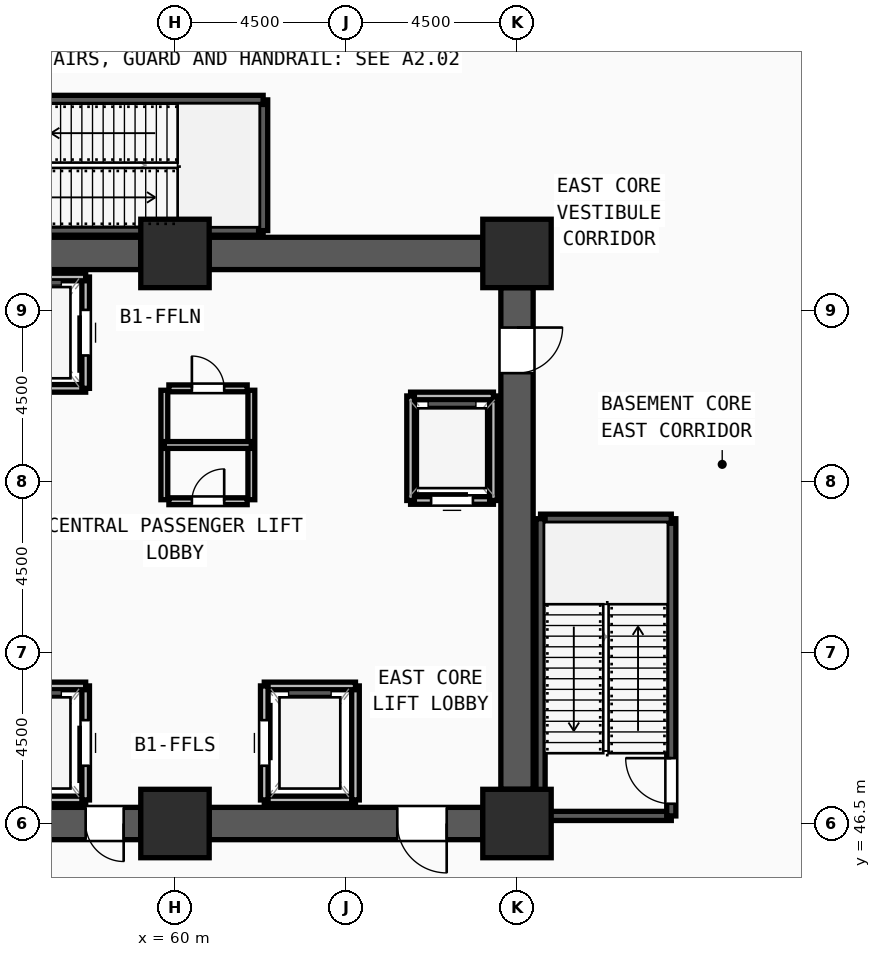
"""IFC4 building model, lengths in metres.
Left out: names, types, materials, properties, quantities, classifications, styles, units other than length and angle.
Written with IfcOpenShell. Run it as: python <this file> out.ifc"""

import sys

from ifc_helpers import new_model, si_unit, direction, frame, frame_2d, origin, origin_2d, place, context, subcontext, project, spatial, rectangle, extrude, source, transform, mapped, element, fill, save


model = new_model("IFC4")
c1 = context("Model", 3, precision=1e-05, world=origin(), true_north=direction((0.0, 1.0)))
c2 = subcontext(c1, "Body", "Model", "MODEL_VIEW")
j1 = project(units=[si_unit("LENGTHUNIT", "METRE"), si_unit("PLANEANGLEUNIT", "RADIAN")], contexts=[c1])
p1 = place(None, origin())
s1 = spatial("IfcSite", under=j1, at=p1, CompositionType="ELEMENT")
p2 = place(p1, origin())
s2 = spatial("IfcBuilding", under=s1, at=p2, CompositionType="ELEMENT")
p3 = place(p2, frame((0.0, 0.0, -4.8)))
s3 = spatial("IfcBuildingStorey", under=s2, at=p3, CompositionType="ELEMENT", Elevation=-4.8)
m1 = source(origin(), c2, "Body", "SweptSolid", [
    extrude(rectangle(XDim=1.8, YDim=1.8, at=origin_2d()), origin(), (0.0, 0.0, 1.0), 4.8),
])
for number, where, z_axis, x_axis in (
    (1, (60.0, 46.5, 0.0), (0.0, 0.0, 1.0), (1.0, 0.0, 0.0)),
    (2, (69.0, 46.5, 0.0), (0.0, 0.0, 1.0), (1.0, 0.0, 0.0)),
    (3, (69.0, 61.5, 0.0), (0.0, 0.0, 1.0), (1.0, 0.0, 0.0)),
    (4, (60.0, 61.5, 0.0), (0.0, 0.0, 1.0), (1.0, 0.0, 0.0)),
):
    element("IfcColumn", number, at=place(p3, frame(where, z_axis=z_axis, x_axis=x_axis)), inside=s3, PredefinedType="COLUMN", context=c2, shape_type="MappedRepresentation", body=[
        mapped(m1, transform((0.0, 0.0, 0.0), x_axis=(1.0, 0.0, 0.0), y_axis=(0.0, 1.0, 0.0), z_axis=(0.0, 0.0, 1.0), scale=1.0)),
    ])
for number, where, z_axis, x_axis in (
    (5, (51.9, 61.5, 0.0), (0.0, 0.0, 1.0), (1.0, 0.0, 0.0)),
    (6, (60.9, 61.5, 0.0), (0.0, 0.0, 1.0), (1.0, 0.0, 0.0)),
):
    element("IfcWall", number, at=place(p3, frame(where, z_axis=z_axis, x_axis=x_axis)), inside=s3, PredefinedType="SHEAR", context=c2, shape_type="SweptSolid", body=[
        extrude(rectangle(XDim=7.2, YDim=0.85, at=frame_2d((3.6, 0.0))), origin(), (0.0, 0.0, 1.0), 4.55),
    ])
p4 = place(p3, frame((69.0, 60.6, 0.0), z_axis=(0.0, 0.0, 1.0), x_axis=(0.0, -1.0, 0.0)))
e7 = element("IfcWall", 7, at=p4, inside=s3, PredefinedType="SHEAR", context=c2, shape_type="SweptSolid", body=[
    extrude(rectangle(XDim=13.2, YDim=0.85, at=frame_2d((6.6, 0.0))), origin(), (0.0, 0.0, 1.0), 4.55),
])
m2 = source(origin(), c2, "Body", "SweptSolid", [
    extrude(rectangle(XDim=1.2, YDim=2.2, at=frame_2d((0.6, 1.1))), frame((0.0, 0.435, 0.0), z_axis=(0.0, -1.0, 0.0), x_axis=(1.0, 0.0, 0.0)), (0.0, 0.0, 1.0), 0.87),
])
p5 = place(p4, frame((1.05, 0.0, 0.0)))
e8 = element("IfcOpeningElement", 8, at=p5, cuts=e7, PredefinedType="OPENING", context=c2, shape_type="MappedRepresentation", body=[
    mapped(m2, transform((0.0, 0.0, 0.0), x_axis=(1.0, 0.0, 0.0), y_axis=(0.0, 1.0, 0.0), z_axis=(0.0, 0.0, 1.0), scale=1.0)),
])
p6 = place(p3, frame((68.1, 46.5, 0.0), z_axis=(0.0, 0.0, 1.0), x_axis=(-1.0, 0.0, 0.0)))
e9 = element("IfcWall", 9, at=p6, inside=s3, PredefinedType="SHEAR", context=c2, shape_type="SweptSolid", body=[
    extrude(rectangle(XDim=7.2, YDim=0.85, at=frame_2d((3.6, 0.0))), origin(), (0.0, 0.0, 1.0), 4.55),
])
m3 = source(origin(), c2, "Body", "SweptSolid", [
    extrude(rectangle(XDim=1.3, YDim=2.2, at=frame_2d((0.65, 1.1))), frame((0.0, 0.435, 0.0), z_axis=(0.0, -1.0, 0.0), x_axis=(1.0, 0.0, 0.0)), (0.0, 0.0, 1.0), 0.87),
])
p7 = place(p6, frame((0.95, 0.0, 0.0)))
e10 = element("IfcOpeningElement", 10, at=p7, cuts=e9, PredefinedType="OPENING", context=c2, shape_type="MappedRepresentation", body=[
    mapped(m3, transform((0.0, 0.0, 0.0), x_axis=(1.0, 0.0, 0.0), y_axis=(0.0, 1.0, 0.0), z_axis=(0.0, 0.0, 1.0), scale=1.0)),
])
p8 = place(p3, frame((59.1, 46.5, 0.0), z_axis=(0.0, 0.0, 1.0), x_axis=(-1.0, 0.0, 0.0)))
e11 = element("IfcWall", 11, at=p8, inside=s3, PredefinedType="SHEAR", context=c2, shape_type="SweptSolid", body=[
    extrude(rectangle(XDim=7.2, YDim=0.85, at=frame_2d((3.6, 0.0))), origin(), (0.0, 0.0, 1.0), 4.55),
])
p9 = place(p8, frame((4.95, 0.0, 0.0)))
e12 = element("IfcOpeningElement", 12, at=p9, cuts=e11, PredefinedType="OPENING", context=c2, shape_type="MappedRepresentation", body=[
    mapped(m3, transform((0.0, 0.0, 0.0), x_axis=(1.0, 0.0, 0.0), y_axis=(0.0, 1.0, 0.0), z_axis=(0.0, 0.0, 1.0), scale=1.0)),
])
m4 = source(origin(), c2, "Body", "SweptSolid", [
    extrude(rectangle(XDim=1.0, YDim=2.2, at=frame_2d((0.5, 1.1))), frame((0.0, 0.435, 0.0), z_axis=(0.0, -1.0, 0.0), x_axis=(1.0, 0.0, 0.0)), (0.0, 0.0, 1.0), 0.87),
])
p10 = place(p8, frame((0.45, 0.0, 0.0)))
e13 = element("IfcOpeningElement", 13, at=p10, cuts=e11, PredefinedType="OPENING", context=c2, shape_type="MappedRepresentation", body=[
    mapped(m4, transform((0.0, 0.0, 0.0), x_axis=(1.0, 0.0, 0.0), y_axis=(0.0, 1.0, 0.0), z_axis=(0.0, 0.0, 1.0), scale=1.0)),
])
p11 = place(p3, frame((69.62, 46.7, 0.0), z_axis=(0.0, 0.0, 1.0), x_axis=(1.0, 0.0, 0.0)))
e14 = element("IfcWall", 14, at=p11, inside=s3, PredefinedType="SOLIDWALL", context=c2, shape_type="SweptSolid", body=[
    extrude(rectangle(XDim=3.44, YDim=0.24, at=frame_2d((1.72, 0.0))), origin(), (0.0, 0.0, 1.0), 4.55),
])
p12 = place(p3, frame((73.06, 46.7, 0.0), z_axis=(0.0, 0.0, 1.0), x_axis=(0.0, 1.0, 0.0)))
e15 = element("IfcWall", 15, at=p12, inside=s3, PredefinedType="SOLIDWALL", context=c2, shape_type="SweptSolid", body=[
    extrude(rectangle(XDim=7.82, YDim=0.24, at=frame_2d((3.91, 0.0))), origin(), (0.0, 0.0, 1.0), 4.55),
])
m5 = source(origin(), c2, "Body", "SweptSolid", [
    extrude(rectangle(XDim=1.2, YDim=2.2, at=frame_2d((0.6, 1.1))), frame((0.0, 0.13, 0.0), z_axis=(0.0, -1.0, 0.0), x_axis=(1.0, 0.0, 0.0)), (0.0, 0.0, 1.0), 0.26),
])
p13 = place(p12, frame((0.32, 0.0, 0.0)))
e16 = element("IfcOpeningElement", 16, at=p13, cuts=e15, PredefinedType="OPENING", context=c2, shape_type="MappedRepresentation", body=[
    mapped(m5, transform((0.0, 0.0, 0.0), x_axis=(1.0, 0.0, 0.0), y_axis=(0.0, 1.0, 0.0), z_axis=(0.0, 0.0, 1.0), scale=1.0)),
])
p14 = place(p3, frame((73.06, 54.52, 0.0), z_axis=(0.0, 0.0, 1.0), x_axis=(-1.0, 0.0, 0.0)))
e17 = element("IfcWall", 17, at=p14, inside=s3, PredefinedType="SOLIDWALL", context=c2, shape_type="SweptSolid", body=[
    extrude(rectangle(XDim=3.44, YDim=0.24, at=frame_2d((1.72, 0.0))), origin(), (0.0, 0.0, 1.0), 4.55),
])
for number, where, z_axis, x_axis in (
    (18, (69.62, 54.52, 0.0), (0.0, 0.0, 1.0), (0.0, -1.0, 0.0)),
    (19, (54.5, 62.1, 0.0), (0.0, 0.0, 1.0), (1.0, 0.0, 0.0)),
):
    element("IfcWall", number, at=place(p3, frame(where, z_axis=z_axis, x_axis=x_axis)), inside=s3, PredefinedType="SOLIDWALL", context=c2, shape_type="SweptSolid", body=[
        extrude(rectangle(XDim=7.82, YDim=0.24, at=frame_2d((3.91, 0.0))), origin(), (0.0, 0.0, 1.0), 4.55),
    ])
p15 = place(p3, frame((62.32, 62.1, 0.0), z_axis=(0.0, 0.0, 1.0), x_axis=(0.0, 1.0, 0.0)))
e20 = element("IfcWall", 20, at=p15, inside=s3, PredefinedType="SOLIDWALL", context=c2, shape_type="SweptSolid", body=[
    extrude(rectangle(XDim=3.44, YDim=0.24, at=frame_2d((1.72, 0.0))), origin(), (0.0, 0.0, 1.0), 4.55),
])
p16 = place(p3, frame((62.32, 65.54, 0.0), z_axis=(0.0, 0.0, 1.0), x_axis=(-1.0, 0.0, 0.0)))
e21 = element("IfcWall", 21, at=p16, inside=s3, PredefinedType="SOLIDWALL", context=c2, shape_type="SweptSolid", body=[
    extrude(rectangle(XDim=7.82, YDim=0.24, at=frame_2d((3.91, 0.0))), origin(), (0.0, 0.0, 1.0), 4.55),
])
p17 = place(p16, frame((6.3, 0.0, 0.0)))
e22 = element("IfcOpeningElement", 22, at=p17, cuts=e21, PredefinedType="OPENING", context=c2, shape_type="MappedRepresentation", body=[
    mapped(m5, transform((0.0, 0.0, 0.0), x_axis=(1.0, 0.0, 0.0), y_axis=(0.0, 1.0, 0.0), z_axis=(0.0, 0.0, 1.0), scale=1.0)),
])
p18 = place(p3, frame((55.25, 47.12, 0.0), z_axis=(0.0, 0.0, 1.0), x_axis=(1.0, 0.0, 0.0)))
e23 = element("IfcWall", 23, at=p18, inside=s3, PredefinedType="SOLIDWALL", context=c2, shape_type="SweptSolid", body=[
    extrude(rectangle(XDim=2.4, YDim=0.2, at=frame_2d((1.2, 0.0))), origin(), (0.0, 0.0, 1.0), 4.55),
])
p19 = place(p3, frame((57.65, 47.12, 0.0), z_axis=(0.0, 0.0, 1.0), x_axis=(0.0, 1.0, 0.0)))
e24 = element("IfcWall", 24, at=p19, inside=s3, PredefinedType="SOLIDWALL", context=c2, shape_type="SweptSolid", body=[
    extrude(rectangle(XDim=3.0, YDim=0.2, at=frame_2d((1.5, 0.0))), origin(), (0.0, 0.0, 1.0), 4.55),
])
m6 = source(origin(), c2, "Body", "SweptSolid", [
    extrude(rectangle(XDim=1.2, YDim=2.3, at=frame_2d((0.6, 1.15))), frame((0.0, 0.11, 0.0), z_axis=(0.0, -1.0, 0.0), x_axis=(1.0, 0.0, 0.0)), (0.0, 0.0, 1.0), 0.22),
])
p20 = place(p19, frame((0.9, 0.0, 0.0)))
e25 = element("IfcOpeningElement", 25, at=p20, cuts=e24, PredefinedType="OPENING", context=c2, shape_type="MappedRepresentation", body=[
    mapped(m6, transform((0.0, 0.0, 0.0), x_axis=(1.0, 0.0, 0.0), y_axis=(0.0, 1.0, 0.0), z_axis=(0.0, 0.0, 1.0), scale=1.0)),
])
for number, where, z_axis, x_axis in (
    (26, (57.65, 50.12, 0.0), (0.0, 0.0, 1.0), (-1.0, 0.0, 0.0)),
    (27, (62.35, 47.12, 0.0), (0.0, 0.0, 1.0), (1.0, 0.0, 0.0)),
):
    element("IfcWall", number, at=place(p3, frame(where, z_axis=z_axis, x_axis=x_axis)), inside=s3, PredefinedType="SOLIDWALL", context=c2, shape_type="SweptSolid", body=[
        extrude(rectangle(XDim=2.4, YDim=0.2, at=frame_2d((1.2, 0.0))), origin(), (0.0, 0.0, 1.0), 4.55),
    ])
p21 = place(p3, frame((64.75, 47.12, 0.0), z_axis=(0.0, 0.0, 1.0), x_axis=(0.0, 1.0, 0.0)))
e28 = element("IfcWall", 28, at=p21, inside=s3, PredefinedType="SOLIDWALL", context=c2, shape_type="SweptSolid", body=[
    extrude(rectangle(XDim=3.0, YDim=0.2, at=frame_2d((1.5, 0.0))), origin(), (0.0, 0.0, 1.0), 4.55),
])
p22 = place(p3, frame((64.75, 50.12, 0.0), z_axis=(0.0, 0.0, 1.0), x_axis=(-1.0, 0.0, 0.0)))
e29 = element("IfcWall", 29, at=p22, inside=s3, PredefinedType="SOLIDWALL", context=c2, shape_type="SweptSolid", body=[
    extrude(rectangle(XDim=2.4, YDim=0.2, at=frame_2d((1.2, 0.0))), origin(), (0.0, 0.0, 1.0), 4.55),
])
p23 = place(p3, frame((62.35, 50.12, 0.0), z_axis=(0.0, 0.0, 1.0), x_axis=(0.0, -1.0, 0.0)))
e30 = element("IfcWall", 30, at=p23, inside=s3, PredefinedType="SOLIDWALL", context=c2, shape_type="SweptSolid", body=[
    extrude(rectangle(XDim=3.0, YDim=0.2, at=frame_2d((1.5, 0.0))), origin(), (0.0, 0.0, 1.0), 4.55),
])
p24 = place(p23, frame((0.9, 0.0, 0.0)))
e31 = element("IfcOpeningElement", 31, at=p24, cuts=e30, PredefinedType="OPENING", context=c2, shape_type="MappedRepresentation", body=[
    mapped(m6, transform((0.0, 0.0, 0.0), x_axis=(1.0, 0.0, 0.0), y_axis=(0.0, 1.0, 0.0), z_axis=(0.0, 0.0, 1.0), scale=1.0)),
])
p25 = place(p3, frame((55.25, 57.95, 0.0), z_axis=(0.0, 0.0, 1.0), x_axis=(1.0, 0.0, 0.0)))
e32 = element("IfcWall", 32, at=p25, inside=s3, PredefinedType="SOLIDWALL", context=c2, shape_type="SweptSolid", body=[
    extrude(rectangle(XDim=2.4, YDim=0.2, at=frame_2d((1.2, 0.0))), origin(), (0.0, 0.0, 1.0), 4.55),
])
p26 = place(p3, frame((57.65, 57.95, 0.0), z_axis=(0.0, 0.0, 1.0), x_axis=(0.0, 1.0, 0.0)))
e33 = element("IfcWall", 33, at=p26, inside=s3, PredefinedType="SOLIDWALL", context=c2, shape_type="SweptSolid", body=[
    extrude(rectangle(XDim=2.93, YDim=0.2, at=frame_2d((1.465, 0.0))), origin(), (0.0, 0.0, 1.0), 4.55),
])
p27 = place(p26, frame((0.865, 0.0, 0.0)))
e34 = element("IfcOpeningElement", 34, at=p27, cuts=e33, PredefinedType="OPENING", context=c2, shape_type="MappedRepresentation", body=[
    mapped(m6, transform((0.0, 0.0, 0.0), x_axis=(1.0, 0.0, 0.0), y_axis=(0.0, 1.0, 0.0), z_axis=(0.0, 0.0, 1.0), scale=1.0)),
])
p28 = place(p3, frame((57.65, 60.88, 0.0), z_axis=(0.0, 0.0, 1.0), x_axis=(-1.0, 0.0, 0.0)))
e35 = element("IfcWall", 35, at=p28, inside=s3, PredefinedType="SOLIDWALL", context=c2, shape_type="SweptSolid", body=[
    extrude(rectangle(XDim=2.4, YDim=0.2, at=frame_2d((1.2, 0.0))), origin(), (0.0, 0.0, 1.0), 4.55),
])
p29 = place(p3, frame((66.2, 55.0, 0.0), z_axis=(0.0, 0.0, 1.0), x_axis=(1.0, 0.0, 0.0)))
e36 = element("IfcWall", 36, at=p29, inside=s3, PredefinedType="SOLIDWALL", context=c2, shape_type="SweptSolid", body=[
    extrude(rectangle(XDim=2.18, YDim=0.2, at=frame_2d((1.09, 0.0))), origin(), (0.0, 0.0, 1.0), 4.55),
])
m7 = source(origin(), c2, "Body", "SweptSolid", [
    extrude(rectangle(XDim=1.1, YDim=2.2, at=frame_2d((0.55, 1.1))), frame((0.0, 0.11, 0.0), z_axis=(0.0, -1.0, 0.0), x_axis=(1.0, 0.0, 0.0)), (0.0, 0.0, 1.0), 0.22),
])
p30 = place(p29, frame((0.54, 0.0, 0.0)))
e37 = element("IfcOpeningElement", 37, at=p30, cuts=e36, PredefinedType="OPENING", context=c2, shape_type="MappedRepresentation", body=[
    mapped(m7, transform((0.0, 0.0, 0.0), x_axis=(1.0, 0.0, 0.0), y_axis=(0.0, 1.0, 0.0), z_axis=(0.0, 0.0, 1.0), scale=1.0)),
])
p31 = place(p3, frame((68.38, 55.0, 0.0), z_axis=(0.0, 0.0, 1.0), x_axis=(0.0, 1.0, 0.0)))
e38 = element("IfcWall", 38, at=p31, inside=s3, PredefinedType="SOLIDWALL", context=c2, shape_type="SweptSolid", body=[
    extrude(rectangle(XDim=2.75, YDim=0.2, at=frame_2d((1.375, 0.0))), origin(), (0.0, 0.0, 1.0), 4.55),
])
p32 = place(p3, frame((68.38, 57.75, 0.0), z_axis=(0.0, 0.0, 1.0), x_axis=(-1.0, 0.0, 0.0)))
e39 = element("IfcWall", 39, at=p32, inside=s3, PredefinedType="SOLIDWALL", context=c2, shape_type="SweptSolid", body=[
    extrude(rectangle(XDim=2.18, YDim=0.2, at=frame_2d((1.09, 0.0))), origin(), (0.0, 0.0, 1.0), 4.55),
])
p33 = place(p3, frame((66.2, 57.75, 0.0), z_axis=(0.0, 0.0, 1.0), x_axis=(0.0, -1.0, 0.0)))
e40 = element("IfcWall", 40, at=p33, inside=s3, PredefinedType="SOLIDWALL", context=c2, shape_type="SweptSolid", body=[
    extrude(rectangle(XDim=2.75, YDim=0.2, at=frame_2d((1.375, 0.0))), origin(), (0.0, 0.0, 1.0), 4.55),
])
p34 = place(p3, frame((59.84, 54.98, 0.0), z_axis=(0.0, 0.0, 1.0), x_axis=(1.0, 0.0, 0.0)))
e41 = element("IfcWall", 41, at=p34, inside=s3, PredefinedType="PARTITIONING", context=c2, shape_type="SweptSolid", body=[
    extrude(rectangle(XDim=2.06, YDim=0.18, at=frame_2d((1.03, 0.0))), origin(), (0.0, 0.0, 1.0), 4.55),
])
m8 = source(origin(), c2, "Body", "SweptSolid", [
    extrude(rectangle(XDim=0.85, YDim=2.1, at=frame_2d((0.425, 1.05))), frame((0.0, 0.1, 0.0), z_axis=(0.0, -1.0, 0.0), x_axis=(1.0, 0.0, 0.0)), (0.0, 0.0, 1.0), 0.2),
])
p35 = place(p34, frame((0.605, 0.0, 0.0)))
e42 = element("IfcOpeningElement", 42, at=p35, cuts=e41, PredefinedType="OPENING", context=c2, shape_type="MappedRepresentation", body=[
    mapped(m8, transform((0.0, 0.0, 0.0), x_axis=(1.0, 0.0, 0.0), y_axis=(0.0, 1.0, 0.0), z_axis=(0.0, 0.0, 1.0), scale=1.0)),
])
p36 = place(p3, frame((59.84, 57.95, 0.0), z_axis=(0.0, 0.0, 1.0), x_axis=(1.0, 0.0, 0.0)))
e43 = element("IfcWall", 43, at=p36, inside=s3, PredefinedType="PARTITIONING", context=c2, shape_type="SweptSolid", body=[
    extrude(rectangle(XDim=2.06, YDim=0.18, at=frame_2d((1.03, 0.0))), origin(), (0.0, 0.0, 1.0), 4.55),
])
p37 = place(p36, frame((0.605, 0.0, 0.0)))
e44 = element("IfcOpeningElement", 44, at=p37, cuts=e43, PredefinedType="OPENING", context=c2, shape_type="MappedRepresentation", body=[
    mapped(m8, transform((0.0, 0.0, 0.0), x_axis=(1.0, 0.0, 0.0), y_axis=(0.0, 1.0, 0.0), z_axis=(0.0, 0.0, 1.0), scale=1.0)),
])
for number, where, z_axis, x_axis in (
    (45, (59.72, 55.02, 0.0), (0.0, 0.0, 1.0), (0.0, 1.0, 0.0)),
    (46, (62.01, 55.02, 0.0), (0.0, 0.0, 1.0), (0.0, 1.0, 0.0)),
):
    element("IfcWall", number, at=place(p3, frame(where, z_axis=z_axis, x_axis=x_axis)), inside=s3, PredefinedType="PARTITIONING", context=c2, shape_type="SweptSolid", body=[
        extrude(rectangle(XDim=2.88, YDim=0.18, at=frame_2d((1.44, 0.0))), origin(), (0.0, 0.0, 1.0), 4.55),
    ])
p38 = place(p3, frame((59.72, 56.46, 0.0), z_axis=(0.0, 0.0, 1.0), x_axis=(1.0, 0.0, 0.0)))
e47 = element("IfcWall", 47, at=p38, inside=s3, PredefinedType="PARTITIONING", context=c2, shape_type="SweptSolid", body=[
    extrude(rectangle(XDim=2.29, YDim=0.18, at=frame_2d((1.145, 0.0))), origin(), (0.0, 0.0, 1.0), 4.55),
])
m9 = source(origin(), c2, "Body", "SweptSolid", [
    extrude(rectangle(XDim=1.0, YDim=2.2, at=frame_2d((0.5, 1.1))), frame((0.0, 0.025, 0.0), z_axis=(0.0, -1.0, 0.0), x_axis=(1.0, 0.0, 0.0)), (0.0, 0.0, 1.0), 0.05),
])
p39 = place(p10, origin())
e48 = element("IfcDoor", 48, at=p39, inside=s3, OperationType="SINGLE_SWING_LEFT", PredefinedType="DOOR", context=c2, shape_type="MappedRepresentation", body=[
    mapped(m9, transform((0.0, 0.0, 0.0), x_axis=(1.0, 0.0, 0.0), y_axis=(0.0, 1.0, 0.0), z_axis=(0.0, 0.0, 1.0), scale=1.0)),
])
fill(e13, e48)
m10 = source(origin(), c2, "Body", "SweptSolid", [
    extrude(rectangle(XDim=1.3, YDim=2.2, at=frame_2d((0.65, 1.1))), frame((0.0, 0.025, 0.0), z_axis=(0.0, -1.0, 0.0), x_axis=(1.0, 0.0, 0.0)), (0.0, 0.0, 1.0), 0.05),
])
p40 = place(p7, origin())
e49 = element("IfcDoor", 49, at=p40, inside=s3, OperationType="SINGLE_SWING_LEFT", PredefinedType="DOOR", context=c2, shape_type="MappedRepresentation", body=[
    mapped(m10, transform((0.0, 0.0, 0.0), x_axis=(1.0, 0.0, 0.0), y_axis=(0.0, 1.0, 0.0), z_axis=(0.0, 0.0, 1.0), scale=1.0)),
])
fill(e10, e49)
m11 = source(origin(), c2, "Body", "SweptSolid", [
    extrude(rectangle(XDim=1.2, YDim=2.2, at=frame_2d((0.6, 1.1))), frame((0.0, 0.025, 0.0), z_axis=(0.0, -1.0, 0.0), x_axis=(1.0, 0.0, 0.0)), (0.0, 0.0, 1.0), 0.05),
])
p41 = place(p5, origin())
e50 = element("IfcDoor", 50, at=p41, inside=s3, OperationType="SINGLE_SWING_LEFT", PredefinedType="DOOR", context=c2, shape_type="MappedRepresentation", body=[
    mapped(m11, transform((0.0, 0.0, 0.0), x_axis=(1.0, 0.0, 0.0), y_axis=(0.0, 1.0, 0.0), z_axis=(0.0, 0.0, 1.0), scale=1.0)),
])
fill(e8, e50)
p42 = place(p13, origin())
e51 = element("IfcDoor", 51, at=p42, inside=s3, OperationType="SINGLE_SWING_RIGHT", PredefinedType="DOOR", context=c2, shape_type="MappedRepresentation", body=[
    mapped(m11, transform((0.0, 0.0, 0.0), x_axis=(1.0, 0.0, 0.0), y_axis=(0.0, 1.0, 0.0), z_axis=(0.0, 0.0, 1.0), scale=1.0)),
])
fill(e16, e51)
m12 = source(origin(), c2, "Body", "SweptSolid", [
    extrude(rectangle(XDim=1.2, YDim=2.3, at=frame_2d((0.6, 1.15))), frame((0.0, 0.025, 0.0), z_axis=(0.0, -1.0, 0.0), x_axis=(1.0, 0.0, 0.0)), (0.0, 0.0, 1.0), 0.05),
])
p43 = place(p20, origin())
e52 = element("IfcDoor", 52, at=p43, inside=s3, OperationType="SLIDING_TO_LEFT", PredefinedType="DOOR", context=c2, shape_type="MappedRepresentation", body=[
    mapped(m12, transform((0.0, 0.0, 0.0), x_axis=(1.0, 0.0, 0.0), y_axis=(0.0, 1.0, 0.0), z_axis=(0.0, 0.0, 1.0), scale=1.0)),
])
fill(e25, e52)
p44 = place(p24, origin())
e53 = element("IfcDoor", 53, at=p44, inside=s3, OperationType="SLIDING_TO_LEFT", PredefinedType="DOOR", context=c2, shape_type="MappedRepresentation", body=[
    mapped(m12, transform((0.0, 0.0, 0.0), x_axis=(1.0, 0.0, 0.0), y_axis=(0.0, 1.0, 0.0), z_axis=(0.0, 0.0, 1.0), scale=1.0)),
])
fill(e31, e53)
p45 = place(p27, origin())
e54 = element("IfcDoor", 54, at=p45, inside=s3, OperationType="SLIDING_TO_LEFT", PredefinedType="DOOR", context=c2, shape_type="MappedRepresentation", body=[
    mapped(m12, transform((0.0, 0.0, 0.0), x_axis=(1.0, 0.0, 0.0), y_axis=(0.0, 1.0, 0.0), z_axis=(0.0, 0.0, 1.0), scale=1.0)),
])
fill(e34, e54)
m13 = source(origin(), c2, "Body", "SweptSolid", [
    extrude(rectangle(XDim=1.1, YDim=2.2, at=frame_2d((0.55, 1.1))), frame((0.0, 0.025, 0.0), z_axis=(0.0, -1.0, 0.0), x_axis=(1.0, 0.0, 0.0)), (0.0, 0.0, 1.0), 0.05),
])
p46 = place(p30, origin())
e55 = element("IfcDoor", 55, at=p46, inside=s3, OperationType="SLIDING_TO_LEFT", PredefinedType="DOOR", context=c2, shape_type="MappedRepresentation", body=[
    mapped(m13, transform((0.0, 0.0, 0.0), x_axis=(1.0, 0.0, 0.0), y_axis=(0.0, 1.0, 0.0), z_axis=(0.0, 0.0, 1.0), scale=1.0)),
])
fill(e37, e55)
m14 = source(origin(), c2, "Body", "SweptSolid", [
    extrude(rectangle(XDim=0.85, YDim=2.1, at=frame_2d((0.425, 1.05))), frame((0.0, 0.025, 0.0), z_axis=(0.0, -1.0, 0.0), x_axis=(1.0, 0.0, 0.0)), (0.0, 0.0, 1.0), 0.05),
])
p47 = place(p35, origin())
e56 = element("IfcDoor", 56, at=p47, inside=s3, OperationType="SINGLE_SWING_RIGHT", PredefinedType="DOOR", context=c2, shape_type="MappedRepresentation", body=[
    mapped(m14, transform((0.0, 0.0, 0.0), x_axis=(1.0, 0.0, 0.0), y_axis=(0.0, 1.0, 0.0), z_axis=(0.0, 0.0, 1.0), scale=1.0)),
])
fill(e42, e56)
p48 = place(p37, origin())
e57 = element("IfcDoor", 57, at=p48, inside=s3, OperationType="SINGLE_SWING_LEFT", PredefinedType="DOOR", context=c2, shape_type="MappedRepresentation", body=[
    mapped(m14, transform((0.0, 0.0, 0.0), x_axis=(1.0, 0.0, 0.0), y_axis=(0.0, 1.0, 0.0), z_axis=(0.0, 0.0, 1.0), scale=1.0)),
])
fill(e44, e57)
save(model, sys.argv[1])
